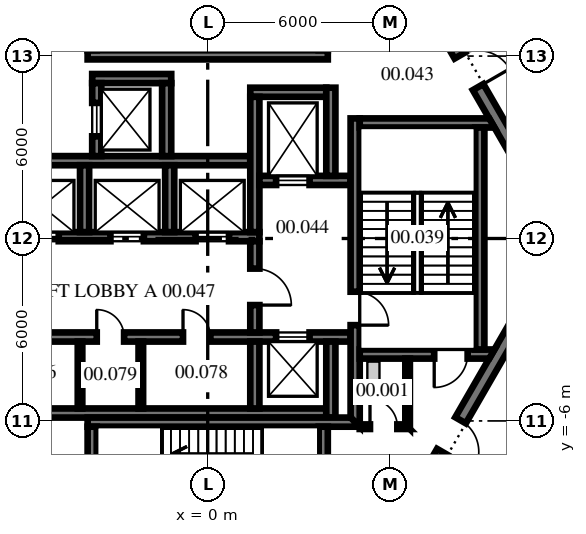
"""IFC4 building model, lengths in metres.
Left out: names, types, materials, properties, quantities, classifications, styles, units other than length and angle.
Written with IfcOpenShell. Run it as: python <this file> out.ifc"""

import sys

from ifc_helpers import new_model, si_unit, direction, frame, frame_2d, origin, place, context, subcontext, project, spatial, polyline, rectangle, outline, extrude, source, transform, mapped, element, fill, save


model = new_model("IFC4")
c1 = context("Model", 3, precision=1e-05, world=origin(), true_north=direction((0.0, 1.0)))
c2 = subcontext(c1, "Body", "Model", "MODEL_VIEW")
j1 = project(units=[si_unit("LENGTHUNIT", "METRE"), si_unit("PLANEANGLEUNIT", "RADIAN")], contexts=[c1])
p1 = place(None, origin())
s1 = spatial("IfcSite", under=j1, at=p1, CompositionType="ELEMENT")
p2 = place(p1, origin())
s2 = spatial("IfcBuilding", under=s1, at=p2, CompositionType="ELEMENT")
p3 = place(p2, origin())
s3 = spatial("IfcBuildingStorey", under=s2, at=p3, CompositionType="ELEMENT", Elevation=0.0)
m1 = source(origin(), c2, "Body", "SweptSolid", [
    extrude(outline(polyline([(-0.115, -0.2), (11.885, -0.2), (11.654, 0.2), (0.115, 0.2), (-0.115, -0.2)])), origin(), (0.0, 0.0, 1.0), 7.0),
])
p4 = place(p3, frame((11.769, 0.0, -0.2), z_axis=(0.0, 0.0, 1.0), x_axis=(-0.499996592174, 0.866027371285, 0.0)))
e1 = element("IfcWall", 1, at=p4, inside=s3, PredefinedType="SHEAR", context=c2, shape_type="MappedRepresentation", body=[
    mapped(m1, transform((0.0, 0.0, 0.0), scale=1.0)),
])
p5 = place(p4, frame((5.75, 0.0, 0.2)))
e2 = element("IfcOpeningElement", 2, at=p5, cuts=e1, PredefinedType="OPENING", context=c2, shape_type="SweptSolid", body=[
    extrude(rectangle(XDim=1.2, YDim=2.1, at=frame_2d((0.6, 1.05))), frame((0.0, 0.21, 0.0), z_axis=(0.0, -1.0, 0.0), x_axis=(1.0, 0.0, 0.0)), (0.0, 0.0, 1.0), 0.42),
])
p6 = place(p3, frame((5.885, -10.192, -0.2), z_axis=(0.0, 0.0, 1.0), x_axis=(0.499996592174, 0.866027371285, 0.0)))
e3 = element("IfcWall", 3, at=p6, inside=s3, PredefinedType="SHEAR", context=c2, shape_type="MappedRepresentation", body=[
    mapped(m1, transform((0.0, 0.0, 0.0), scale=1.0)),
])
p7 = place(p6, frame((3.665, 0.0, 0.2)))
e4 = element("IfcOpeningElement", 4, at=p7, cuts=e3, PredefinedType="OPENING", context=c2, shape_type="SweptSolid", body=[
    extrude(rectangle(XDim=1.2, YDim=2.1, at=frame_2d((0.6, 1.05))), frame((0.0, 0.21, 0.0), z_axis=(0.0, -1.0, 0.0), x_axis=(1.0, 0.0, 0.0)), (0.0, 0.0, 1.0), 0.42),
])
p8 = place(p3, frame((-9.8, 0.06, -0.2), z_axis=(0.0, 0.0, 1.0), x_axis=(1.0, 0.0, 0.0)))
e5 = element("IfcWall", 5, at=p8, inside=s3, PredefinedType="SHEAR", context=c2, shape_type="SweptSolid", body=[
    extrude(rectangle(XDim=11.5, YDim=0.3, at=frame_2d((5.75, 0.0))), origin(), (0.0, 0.0, 1.0), 7.0),
])
p9 = place(p8, frame((1.0, 0.0, 0.2)))
e6 = element("IfcOpeningElement", 6, at=p9, cuts=e5, PredefinedType="OPENING", context=c2, shape_type="SweptSolid", body=[
    extrude(rectangle(XDim=1.1, YDim=2.1, at=frame_2d((0.55, 1.05))), frame((0.0, 0.16, 0.0), z_axis=(0.0, -1.0, 0.0), x_axis=(1.0, 0.0, 0.0)), (0.0, 0.0, 1.0), 0.32),
])
p10 = place(p8, frame((3.8, 0.0, 0.2)))
e7 = element("IfcOpeningElement", 7, at=p10, cuts=e5, PredefinedType="OPENING", context=c2, shape_type="SweptSolid", body=[
    extrude(rectangle(XDim=1.1, YDim=2.1, at=frame_2d((0.55, 1.05))), frame((0.0, 0.16, 0.0), z_axis=(0.0, -1.0, 0.0), x_axis=(1.0, 0.0, 0.0)), (0.0, 0.0, 1.0), 0.32),
])
p11 = place(p8, frame((6.6, 0.0, 0.2)))
e8 = element("IfcOpeningElement", 8, at=p11, cuts=e5, PredefinedType="OPENING", context=c2, shape_type="SweptSolid", body=[
    extrude(rectangle(XDim=1.1, YDim=2.1, at=frame_2d((0.55, 1.05))), frame((0.0, 0.16, 0.0), z_axis=(0.0, -1.0, 0.0), x_axis=(1.0, 0.0, 0.0)), (0.0, 0.0, 1.0), 0.32),
])
p12 = place(p8, frame((9.4, 0.0, 0.2)))
e9 = element("IfcOpeningElement", 9, at=p12, cuts=e5, PredefinedType="OPENING", context=c2, shape_type="SweptSolid", body=[
    extrude(rectangle(XDim=1.1, YDim=2.1, at=frame_2d((0.55, 1.05))), frame((0.0, 0.16, 0.0), z_axis=(0.0, -1.0, 0.0), x_axis=(1.0, 0.0, 0.0)), (0.0, 0.0, 1.0), 0.32),
])
p13 = place(p3, frame((-9.8, 2.56, -0.2), z_axis=(0.0, 0.0, 1.0), x_axis=(1.0, 0.0, 0.0)))
e10 = element("IfcWall", 10, at=p13, inside=s3, PredefinedType="SHEAR", context=c2, shape_type="SweptSolid", body=[
    extrude(outline(polyline([(11.2, -0.15), (-0.349, -0.15), (-0.176, 0.15), (11.2, 0.15), (11.2, -0.15)])), origin(), (0.0, 0.0, 1.0), 7.0),
])
m2 = source(origin(), c2, "Body", "SweptSolid", [
    extrude(rectangle(XDim=2.5, YDim=0.3, at=frame_2d((1.25, 0.0))), origin(), (0.0, 0.0, 1.0), 7.0),
])
p14 = place(p3, frame((1.4, 4.81, -0.2), z_axis=(0.0, 0.0, 1.0), x_axis=(1.0, 0.0, 0.0)))
e11 = element("IfcWall", 11, at=p14, inside=s3, PredefinedType="SHEAR", context=c2, shape_type="MappedRepresentation", body=[
    mapped(m2, transform((0.0, 0.0, 0.0), scale=1.0)),
])
p15 = place(p3, frame((1.55, 0.21, -0.2), z_axis=(0.0, 0.0, 1.0), x_axis=(0.0, 1.0, 0.0)))
e12 = element("IfcWall", 12, at=p15, inside=s3, PredefinedType="SHEAR", context=c2, shape_type="SweptSolid", body=[
    extrude(rectangle(XDim=4.45, YDim=0.3, at=frame_2d((2.225, 0.0))), origin(), (0.0, 0.0, 1.0), 7.0),
])
m3 = source(origin(), c2, "Body", "SweptSolid", [
    extrude(rectangle(XDim=3.0, YDim=0.3, at=frame_2d((1.5, 0.0))), origin(), (0.0, 0.0, 1.0), 7.0),
])
p16 = place(p3, frame((1.7, 1.91, -0.2), z_axis=(0.0, 0.0, 1.0), x_axis=(1.0, 0.0, 0.0)))
e13 = element("IfcWall", 13, at=p16, inside=s3, PredefinedType="SHEAR", context=c2, shape_type="MappedRepresentation", body=[
    mapped(m3, transform((0.0, 0.0, 0.0), scale=1.0)),
])
p17 = place(p16, frame((0.55, 0.0, 0.2)))
e14 = element("IfcOpeningElement", 14, at=p17, cuts=e13, PredefinedType="OPENING", context=c2, shape_type="SweptSolid", body=[
    extrude(rectangle(XDim=1.1, YDim=2.1, at=frame_2d((0.55, 1.05))), frame((0.0, 0.16, 0.0), z_axis=(0.0, -1.0, 0.0), x_axis=(1.0, 0.0, 0.0)), (0.0, 0.0, 1.0), 0.32),
])
p18 = place(p3, frame((4.05, 2.06, -0.2), z_axis=(0.0, 0.0, 1.0), x_axis=(0.0, 1.0, 0.0)))
e15 = element("IfcWall", 15, at=p18, inside=s3, PredefinedType="SHEAR", context=c2, shape_type="SweptSolid", body=[
    extrude(rectangle(XDim=2.9, YDim=0.3, at=frame_2d((1.45, 0.0))), origin(), (0.0, 0.0, 1.0), 7.0),
])
p19 = place(p3, frame((-8.1, -3.24, -0.2), z_axis=(0.0, 0.0, 1.0), x_axis=(1.0, 0.0, 0.0)))
e16 = element("IfcWall", 16, at=p19, inside=s3, PredefinedType="SHEAR", context=c2, shape_type="SweptSolid", body=[
    extrude(rectangle(XDim=12.8, YDim=0.3, at=frame_2d((6.4, 0.0))), origin(), (0.0, 0.0, 1.0), 7.0),
])
p20 = place(p19, frame((1.613, 0.0, 0.2)))
e17 = element("IfcOpeningElement", 17, at=p20, cuts=e16, PredefinedType="OPENING", context=c2, shape_type="SweptSolid", body=[
    extrude(rectangle(XDim=0.9, YDim=2.1, at=frame_2d((0.45, 1.05))), frame((0.0, 0.16, 0.0), z_axis=(0.0, -1.0, 0.0), x_axis=(1.0, 0.0, 0.0)), (0.0, 0.0, 1.0), 0.32),
])
p21 = place(p19, frame((4.45, 0.0, 0.2)))
e18 = element("IfcOpeningElement", 18, at=p21, cuts=e16, PredefinedType="OPENING", context=c2, shape_type="SweptSolid", body=[
    extrude(rectangle(XDim=0.9, YDim=2.1, at=frame_2d((0.45, 1.05))), frame((0.0, 0.16, 0.0), z_axis=(0.0, -1.0, 0.0), x_axis=(1.0, 0.0, 0.0)), (0.0, 0.0, 1.0), 0.32),
])
p22 = place(p19, frame((7.288, 0.0, 0.2)))
e19 = element("IfcOpeningElement", 19, at=p22, cuts=e16, PredefinedType="OPENING", context=c2, shape_type="SweptSolid", body=[
    extrude(rectangle(XDim=0.9, YDim=2.1, at=frame_2d((0.45, 1.05))), frame((0.0, 0.16, 0.0), z_axis=(0.0, -1.0, 0.0), x_axis=(1.0, 0.0, 0.0)), (0.0, 0.0, 1.0), 0.32),
])
p23 = place(p19, frame((10.35, 0.0, 0.2)))
e20 = element("IfcOpeningElement", 20, at=p23, cuts=e16, PredefinedType="OPENING", context=c2, shape_type="SweptSolid", body=[
    extrude(rectangle(XDim=1.1, YDim=2.1, at=frame_2d((0.55, 1.05))), frame((0.0, 0.16, 0.0), z_axis=(0.0, -1.0, 0.0), x_axis=(1.0, 0.0, 0.0)), (0.0, 0.0, 1.0), 0.32),
])
p24 = place(p3, frame((-8.1, -5.74, -0.2), z_axis=(0.0, 0.0, 1.0), x_axis=(1.0, 0.0, 0.0)))
e21 = element("IfcWall", 21, at=p24, inside=s3, PredefinedType="SHEAR", context=c2, shape_type="SweptSolid", body=[
    extrude(outline(polyline([(12.0, -0.15), (-0.04, -0.15), (-0.213, 0.15), (12.0, 0.15), (12.0, -0.15)])), origin(), (0.0, 0.0, 1.0), 7.0),
])
m4 = source(origin(), c2, "Body", "SweptSolid", [
    extrude(rectangle(XDim=2.2, YDim=0.3, at=frame_2d((1.1, 0.0))), origin(), (0.0, 0.0, 1.0), 7.0),
])
p25 = place(p3, frame((1.55, -5.59, -0.2), z_axis=(0.0, 0.0, 1.0), x_axis=(0.0, 1.0, 0.0)))
e22 = element("IfcWall", 22, at=p25, inside=s3, PredefinedType="SHEAR", context=c2, shape_type="MappedRepresentation", body=[
    mapped(m4, transform((0.0, 0.0, 0.0), scale=1.0)),
])
p26 = place(p3, frame((4.05, -5.89, -0.2), z_axis=(0.0, 0.0, 1.0), x_axis=(0.0, 1.0, 0.0)))
e23 = element("IfcWall", 23, at=p26, inside=s3, PredefinedType="SHEAR", context=c2, shape_type="MappedRepresentation", body=[
    mapped(m2, transform((0.0, 0.0, 0.0), scale=1.0)),
])
p27 = place(p3, frame((1.55, -3.09, -0.2), z_axis=(0.0, 0.0, 1.0), x_axis=(0.0, 1.0, 0.0)))
e24 = element("IfcWall", 24, at=p27, inside=s3, PredefinedType="SHEAR", context=c2, shape_type="MappedRepresentation", body=[
    mapped(m3, transform((0.0, 0.0, 0.0), scale=1.0)),
])
p28 = place(p27, frame((0.9, 0.0, 0.2)))
e25 = element("IfcOpeningElement", 25, at=p28, cuts=e24, PredefinedType="OPENING", context=c2, shape_type="SweptSolid", body=[
    extrude(rectangle(XDim=1.2, YDim=2.1, at=frame_2d((0.6, 1.05))), frame((0.0, 0.16, 0.0), z_axis=(0.0, -1.0, 0.0), x_axis=(1.0, 0.0, 0.0)), (0.0, 0.0, 1.0), 0.32),
])
p29 = place(p3, frame((4.85, -6.04, -0.2), z_axis=(0.0, 0.0, 1.0), x_axis=(0.0, 1.0, 0.0)))
e26 = element("IfcWall", 26, at=p29, inside=s3, PredefinedType="SHEAR", context=c2, shape_type="SweptSolid", body=[
    extrude(outline(polyline([(-0.15, -0.15), (9.99, -0.15), (9.99, 0.15), (0.15, 0.15), (-0.15, -0.15)])), origin(), (0.0, 0.0, 1.0), 7.0),
])
p30 = place(p29, frame((3.19, 0.0, 0.2)))
e27 = element("IfcOpeningElement", 27, at=p30, cuts=e26, PredefinedType="OPENING", context=c2, shape_type="SweptSolid", body=[
    extrude(rectangle(XDim=1.1, YDim=2.1, at=frame_2d((0.55, 1.05))), frame((0.0, 0.16, 0.0), z_axis=(0.0, -1.0, 0.0), x_axis=(1.0, 0.0, 0.0)), (0.0, 0.0, 1.0), 0.32),
])
p31 = place(p3, frame((5.0, 3.8, -0.2), z_axis=(0.0, 0.0, 1.0), x_axis=(1.0, 0.0, 0.0)))
e28 = element("IfcWall", 28, at=p31, inside=s3, PredefinedType="SHEAR", context=c2, shape_type="SweptSolid", body=[
    extrude(outline(polyline([(0.0, -0.15), (0.0, 0.15), (4.26, 0.15), (4.433, -0.15), (0.0, -0.15)])), origin(), (0.0, 0.0, 1.0), 7.0),
])
p32 = place(p3, frame((5.0, -3.8, -0.2), z_axis=(0.0, 0.0, 1.0), x_axis=(1.0, 0.0, 0.0)))
e29 = element("IfcWall", 29, at=p32, inside=s3, PredefinedType="SHEAR", context=c2, shape_type="SweptSolid", body=[
    extrude(outline(polyline([(0.0, -0.15), (0.0, 0.15), (4.433, 0.15), (4.26, -0.15), (0.0, -0.15)])), origin(), (0.0, 0.0, 1.0), 7.0),
])
p33 = place(p32, frame((2.45, 0.0, 0.2)))
e30 = element("IfcOpeningElement", 30, at=p33, cuts=e29, PredefinedType="OPENING", context=c2, shape_type="SweptSolid", body=[
    extrude(rectangle(XDim=1.1, YDim=2.1, at=frame_2d((0.55, 1.05))), frame((0.0, 0.16, 0.0), z_axis=(0.0, -1.0, 0.0), x_axis=(1.0, 0.0, 0.0)), (0.0, 0.0, 1.0), 0.32),
])
p34 = place(p3, frame((8.95, -3.65, -0.2), z_axis=(0.0, 0.0, 1.0), x_axis=(0.0, 1.0, 0.0)))
e31 = element("IfcWall", 31, at=p34, inside=s3, PredefinedType="SHEAR", context=c2, shape_type="SweptSolid", body=[
    extrude(rectangle(XDim=7.3, YDim=0.3, at=frame_2d((3.65, 0.0))), origin(), (0.0, 0.0, 1.0), 7.0),
])
p35 = place(p3, frame((-3.95, 6.04, -0.2), z_axis=(0.0, 0.0, 1.0), x_axis=(1.0, 0.0, 0.0)))
e32 = element("IfcWall", 32, at=p35, inside=s3, PredefinedType="SHEAR", context=c2, shape_type="SweptSolid", body=[
    extrude(rectangle(XDim=7.9, YDim=0.3, at=frame_2d((3.95, 0.0))), origin(), (0.0, 0.0, 1.0), 7.0),
])
p36 = place(p3, frame((-3.95, -6.04, -0.2), z_axis=(0.0, 0.0, 1.0), x_axis=(1.0, 0.0, 0.0)))
e33 = element("IfcWall", 33, at=p36, inside=s3, PredefinedType="SHEAR", context=c2, shape_type="SweptSolid", body=[
    extrude(outline(polyline([(0.0, -0.15), (8.95, -0.15), (8.65, 0.15), (0.0, 0.15), (0.0, -0.15)])), origin(), (0.0, 0.0, 1.0), 7.0),
])
m5 = source(origin(), c2, "Body", "SweptSolid", [
    extrude(outline(polyline([(3.8, -0.15), (-0.004, -0.15), (-0.004, 0.15), (3.8, 0.15), (3.8, -0.15)])), origin(), (0.0, 0.0, 1.0), 7.0),
])
for number, where, z_axis, x_axis in (
    (34, (-3.8, -9.99, -0.2), (0.0, 0.0, 1.0), (0.0, 1.0, 0.0)),
    (35, (3.8, -9.99, -0.2), (0.0, 0.0, 1.0), (0.0, 1.0, 0.0)),
):
    element("IfcWall", number, at=place(p3, frame(where, z_axis=z_axis, x_axis=x_axis)), inside=s3, PredefinedType="SHEAR", context=c2, shape_type="MappedRepresentation", body=[
        mapped(m5, transform((0.0, 0.0, 0.0), scale=1.0)),
    ])
p37 = place(p3, frame((-3.8, 5.26, -0.2), z_axis=(0.0, 0.0, 1.0), x_axis=(1.0, 0.0, 0.0)))
e36 = element("IfcWall", 36, at=p37, inside=s3, PredefinedType="SHEAR", context=c2, shape_type="SweptSolid", body=[
    extrude(rectangle(XDim=2.6, YDim=0.3, at=frame_2d((1.3, 0.0))), origin(), (0.0, 0.0, 1.0), 7.0),
])
m6 = source(origin(), c2, "Body", "SweptSolid", [
    extrude(rectangle(XDim=2.4, YDim=0.3, at=frame_2d((1.2, 0.0))), origin(), (0.0, 0.0, 1.0), 7.0),
])
p38 = place(p3, frame((-3.65, 2.71, -0.2), z_axis=(0.0, 0.0, 1.0), x_axis=(0.0, 1.0, 0.0)))
e37 = element("IfcWall", 37, at=p38, inside=s3, PredefinedType="SHEAR", context=c2, shape_type="MappedRepresentation", body=[
    mapped(m6, transform((0.0, 0.0, 0.0), scale=1.0)),
])
p39 = place(p38, frame((0.65, 0.0, 0.2)))
e38 = element("IfcOpeningElement", 38, at=p39, cuts=e37, PredefinedType="OPENING", context=c2, shape_type="SweptSolid", body=[
    extrude(rectangle(XDim=1.1, YDim=2.1, at=frame_2d((0.55, 1.05))), frame((0.0, 0.16, 0.0), z_axis=(0.0, -1.0, 0.0), x_axis=(1.0, 0.0, 0.0)), (0.0, 0.0, 1.0), 0.32),
])
p40 = place(p3, frame((-1.35, 2.71, -0.2), z_axis=(0.0, 0.0, 1.0), x_axis=(0.0, 1.0, 0.0)))
e39 = element("IfcWall", 39, at=p40, inside=s3, PredefinedType="SHEAR", context=c2, shape_type="MappedRepresentation", body=[
    mapped(m6, transform((0.0, 0.0, 0.0), scale=1.0)),
])
p41 = place(p3, frame((5.0, -6.19, 0.0), z_axis=(0.0, 0.0, 1.0), x_axis=(1.0, 0.0, 0.0)))
e40 = element("IfcWall", 40, at=p41, inside=s3, PredefinedType="PARTITIONING", context=c2, shape_type="SweptSolid", body=[
    extrude(outline(polyline([(0.0, -0.075), (1.65, -0.075), (1.5, 0.075), (0.0, 0.075), (0.0, -0.075)])), origin(), (0.0, 0.0, 1.0), 6.8),
])
p42 = place(p41, frame((0.337, 0.0, 0.0)))
e41 = element("IfcOpeningElement", 41, at=p42, cuts=e40, PredefinedType="OPENING", context=c2, shape_type="SweptSolid", body=[
    extrude(rectangle(XDim=0.9, YDim=2.1, at=frame_2d((0.45, 1.05))), frame((0.0, 0.085, 0.0), z_axis=(0.0, -1.0, 0.0), x_axis=(1.0, 0.0, 0.0)), (0.0, 0.0, 1.0), 0.17),
])
p43 = place(p3, frame((6.575, -6.19, 0.0), z_axis=(0.0, 0.0, 1.0), x_axis=(0.0, 1.0, 0.0)))
e42 = element("IfcWall", 42, at=p43, inside=s3, PredefinedType="PARTITIONING", context=c2, shape_type="SweptSolid", body=[
    extrude(outline(polyline([(-0.075, -0.075), (2.24, -0.075), (2.24, 0.075), (0.075, 0.075), (-0.075, -0.075)])), origin(), (0.0, 0.0, 1.0), 6.8),
])
m7 = source(origin(), c2, "Body", "SweptSolid", [
    extrude(rectangle(XDim=2.2, YDim=0.3, at=frame_2d((1.1, 0.0))), origin(), (0.0, 0.0, 1.0), 7.0),
])
for number, where, z_axis, x_axis in (
    (43, (-4.05, 0.21, -0.2), (0.0, 0.0, 1.0), (0.0, 1.0, 0.0)),
    (44, (-1.25, 0.21, -0.2), (0.0, 0.0, 1.0), (0.0, 1.0, 0.0)),
):
    element("IfcWall", number, at=place(p3, frame(where, z_axis=z_axis, x_axis=x_axis)), inside=s3, PredefinedType="SHEAR", context=c2, shape_type="MappedRepresentation", body=[
        mapped(m7, transform((0.0, 0.0, 0.0), scale=1.0)),
    ])
m8 = source(origin(), c2, "Body", "SweptSolid", [
    extrude(rectangle(XDim=2.2, YDim=0.15, at=frame_2d((1.1, 0.0))), origin(), (0.0, 0.0, 1.0), 6.8),
])
for number, where, z_axis, x_axis in (
    (45, (-4.2, -5.59, 0.0), (0.0, 0.0, 1.0), (0.0, 1.0, 0.0)),
    (46, (-2.2, -5.59, 0.0), (0.0, 0.0, 1.0), (0.0, 1.0, 0.0)),
):
    element("IfcWall", number, at=place(p3, frame(where, z_axis=z_axis, x_axis=x_axis)), inside=s3, PredefinedType="PARTITIONING", context=c2, shape_type="MappedRepresentation", body=[
        mapped(m8, transform((0.0, 0.0, 0.0), scale=1.0)),
    ])
p44 = place(p3, frame((8.909, -9.554, 0.0), z_axis=(0.0, 0.0, 1.0), x_axis=(0.499986601258, 0.866033139413, 0.0)))
e47 = element("IfcWall", 47, at=p44, inside=s3, PredefinedType="PARTITIONING", context=c2, shape_type="SweptSolid", body=[
    extrude(rectangle(XDim=7.227, YDim=0.2, at=frame_2d((3.614, 0.0))), origin(), (0.0, 0.0, 1.0), 6.8),
])
p45 = place(p5, frame((1.2, 0.0, 0.0), z_axis=(0.0, 0.0, 1.0), x_axis=(-1.0, 0.0, 0.0)))
e48 = element("IfcDoor", 48, at=p45, inside=s3, OperationType="SINGLE_SWING_RIGHT", PredefinedType="DOOR", context=c2, shape_type="SweptSolid", body=[
    extrude(rectangle(XDim=1.2, YDim=2.1, at=frame_2d((0.6, 1.05))), frame((0.0, 0.025, 0.0), z_axis=(0.0, -1.0, 0.0), x_axis=(1.0, 0.0, 0.0)), (0.0, 0.0, 1.0), 0.05),
])
fill(e2, e48)
p46 = place(p7, frame((1.2, 0.0, 0.0), z_axis=(0.0, 0.0, 1.0), x_axis=(-1.0, 0.0, 0.0)))
e49 = element("IfcDoor", 49, at=p46, inside=s3, OperationType="SINGLE_SWING_RIGHT", PredefinedType="DOOR", context=c2, shape_type="SweptSolid", body=[
    extrude(rectangle(XDim=1.2, YDim=2.1, at=frame_2d((0.6, 1.05))), frame((0.0, 0.025, 0.0), z_axis=(0.0, -1.0, 0.0), x_axis=(1.0, 0.0, 0.0)), (0.0, 0.0, 1.0), 0.05),
])
fill(e4, e49)
p47 = place(p30, frame((1.1, 0.0, 0.0), z_axis=(0.0, 0.0, 1.0), x_axis=(-1.0, 0.0, 0.0)))
e50 = element("IfcDoor", 50, at=p47, inside=s3, OperationType="SINGLE_SWING_RIGHT", PredefinedType="DOOR", context=c2, shape_type="SweptSolid", body=[
    extrude(rectangle(XDim=1.1, YDim=2.1, at=frame_2d((0.55, 1.05))), frame((0.0, 0.025, 0.0), z_axis=(0.0, -1.0, 0.0), x_axis=(1.0, 0.0, 0.0)), (0.0, 0.0, 1.0), 0.05),
])
fill(e27, e50)
p48 = place(p33, frame((1.1, 0.0, 0.0), z_axis=(0.0, 0.0, 1.0), x_axis=(-1.0, 0.0, 0.0)))
e51 = element("IfcDoor", 51, at=p48, inside=s3, OperationType="SINGLE_SWING_RIGHT", PredefinedType="DOOR", context=c2, shape_type="SweptSolid", body=[
    extrude(rectangle(XDim=1.1, YDim=2.1, at=frame_2d((0.55, 1.05))), frame((0.0, 0.025, 0.0), z_axis=(0.0, -1.0, 0.0), x_axis=(1.0, 0.0, 0.0)), (0.0, 0.0, 1.0), 0.05),
])
fill(e30, e51)
p49 = place(p28, frame((1.2, 0.0, 0.0), z_axis=(0.0, 0.0, 1.0), x_axis=(-1.0, 0.0, 0.0)))
e52 = element("IfcDoor", 52, at=p49, inside=s3, OperationType="SINGLE_SWING_RIGHT", PredefinedType="DOOR", context=c2, shape_type="SweptSolid", body=[
    extrude(rectangle(XDim=1.2, YDim=2.1, at=frame_2d((0.6, 1.05))), frame((0.0, 0.025, 0.0), z_axis=(0.0, -1.0, 0.0), x_axis=(1.0, 0.0, 0.0)), (0.0, 0.0, 1.0), 0.05),
])
fill(e25, e52)
p50 = place(p42, origin())
e53 = element("IfcDoor", 53, at=p50, inside=s3, OperationType="SINGLE_SWING_LEFT", PredefinedType="DOOR", context=c2, shape_type="SweptSolid", body=[
    extrude(rectangle(XDim=0.9, YDim=2.1, at=frame_2d((0.45, 1.05))), frame((0.0, 0.025, 0.0), z_axis=(0.0, -1.0, 0.0), x_axis=(1.0, 0.0, 0.0)), (0.0, 0.0, 1.0), 0.05),
])
fill(e41, e53)
p51 = place(p21, origin())
e54 = element("IfcDoor", 54, at=p51, inside=s3, OperationType="SINGLE_SWING_LEFT", PredefinedType="DOOR", context=c2, shape_type="SweptSolid", body=[
    extrude(rectangle(XDim=0.9, YDim=2.1, at=frame_2d((0.45, 1.05))), frame((0.0, 0.025, 0.0), z_axis=(0.0, -1.0, 0.0), x_axis=(1.0, 0.0, 0.0)), (0.0, 0.0, 1.0), 0.05),
])
fill(e18, e54)
p52 = place(p22, origin())
e55 = element("IfcDoor", 55, at=p52, inside=s3, OperationType="SINGLE_SWING_LEFT", PredefinedType="DOOR", context=c2, shape_type="SweptSolid", body=[
    extrude(rectangle(XDim=0.9, YDim=2.1, at=frame_2d((0.45, 1.05))), frame((0.0, 0.025, 0.0), z_axis=(0.0, -1.0, 0.0), x_axis=(1.0, 0.0, 0.0)), (0.0, 0.0, 1.0), 0.05),
])
fill(e19, e55)
p53 = place(p10, origin())
e56 = element("IfcDoor", 56, at=p53, inside=s3, OperationType="DOUBLE_DOOR_SLIDING", PredefinedType="DOOR", context=c2, shape_type="SweptSolid", body=[
    extrude(rectangle(XDim=1.1, YDim=2.1, at=frame_2d((0.55, 1.05))), frame((0.0, 0.025, 0.0), z_axis=(0.0, -1.0, 0.0), x_axis=(1.0, 0.0, 0.0)), (0.0, 0.0, 1.0), 0.05),
])
fill(e7, e56)
p54 = place(p11, origin())
e57 = element("IfcDoor", 57, at=p54, inside=s3, OperationType="DOUBLE_DOOR_SLIDING", PredefinedType="DOOR", context=c2, shape_type="SweptSolid", body=[
    extrude(rectangle(XDim=1.1, YDim=2.1, at=frame_2d((0.55, 1.05))), frame((0.0, 0.025, 0.0), z_axis=(0.0, -1.0, 0.0), x_axis=(1.0, 0.0, 0.0)), (0.0, 0.0, 1.0), 0.05),
])
fill(e8, e57)
p55 = place(p12, origin())
e58 = element("IfcDoor", 58, at=p55, inside=s3, OperationType="DOUBLE_DOOR_SLIDING", PredefinedType="DOOR", context=c2, shape_type="SweptSolid", body=[
    extrude(rectangle(XDim=1.1, YDim=2.1, at=frame_2d((0.55, 1.05))), frame((0.0, 0.025, 0.0), z_axis=(0.0, -1.0, 0.0), x_axis=(1.0, 0.0, 0.0)), (0.0, 0.0, 1.0), 0.05),
])
fill(e9, e58)
p56 = place(p17, origin())
e59 = element("IfcDoor", 59, at=p56, inside=s3, OperationType="DOUBLE_DOOR_SLIDING", PredefinedType="DOOR", context=c2, shape_type="SweptSolid", body=[
    extrude(rectangle(XDim=1.1, YDim=2.1, at=frame_2d((0.55, 1.05))), frame((0.0, 0.025, 0.0), z_axis=(0.0, -1.0, 0.0), x_axis=(1.0, 0.0, 0.0)), (0.0, 0.0, 1.0), 0.05),
])
fill(e14, e59)
p57 = place(p23, origin())
e60 = element("IfcDoor", 60, at=p57, inside=s3, OperationType="DOUBLE_DOOR_SLIDING", PredefinedType="DOOR", context=c2, shape_type="SweptSolid", body=[
    extrude(rectangle(XDim=1.1, YDim=2.1, at=frame_2d((0.55, 1.05))), frame((0.0, 0.025, 0.0), z_axis=(0.0, -1.0, 0.0), x_axis=(1.0, 0.0, 0.0)), (0.0, 0.0, 1.0), 0.05),
])
fill(e20, e60)
p58 = place(p39, origin())
e61 = element("IfcDoor", 61, at=p58, inside=s3, OperationType="DOUBLE_DOOR_SLIDING", PredefinedType="DOOR", context=c2, shape_type="SweptSolid", body=[
    extrude(rectangle(XDim=1.1, YDim=2.1, at=frame_2d((0.55, 1.05))), frame((0.0, 0.025, 0.0), z_axis=(0.0, -1.0, 0.0), x_axis=(1.0, 0.0, 0.0)), (0.0, 0.0, 1.0), 0.05),
])
fill(e38, e61)
save(model, sys.argv[1])
